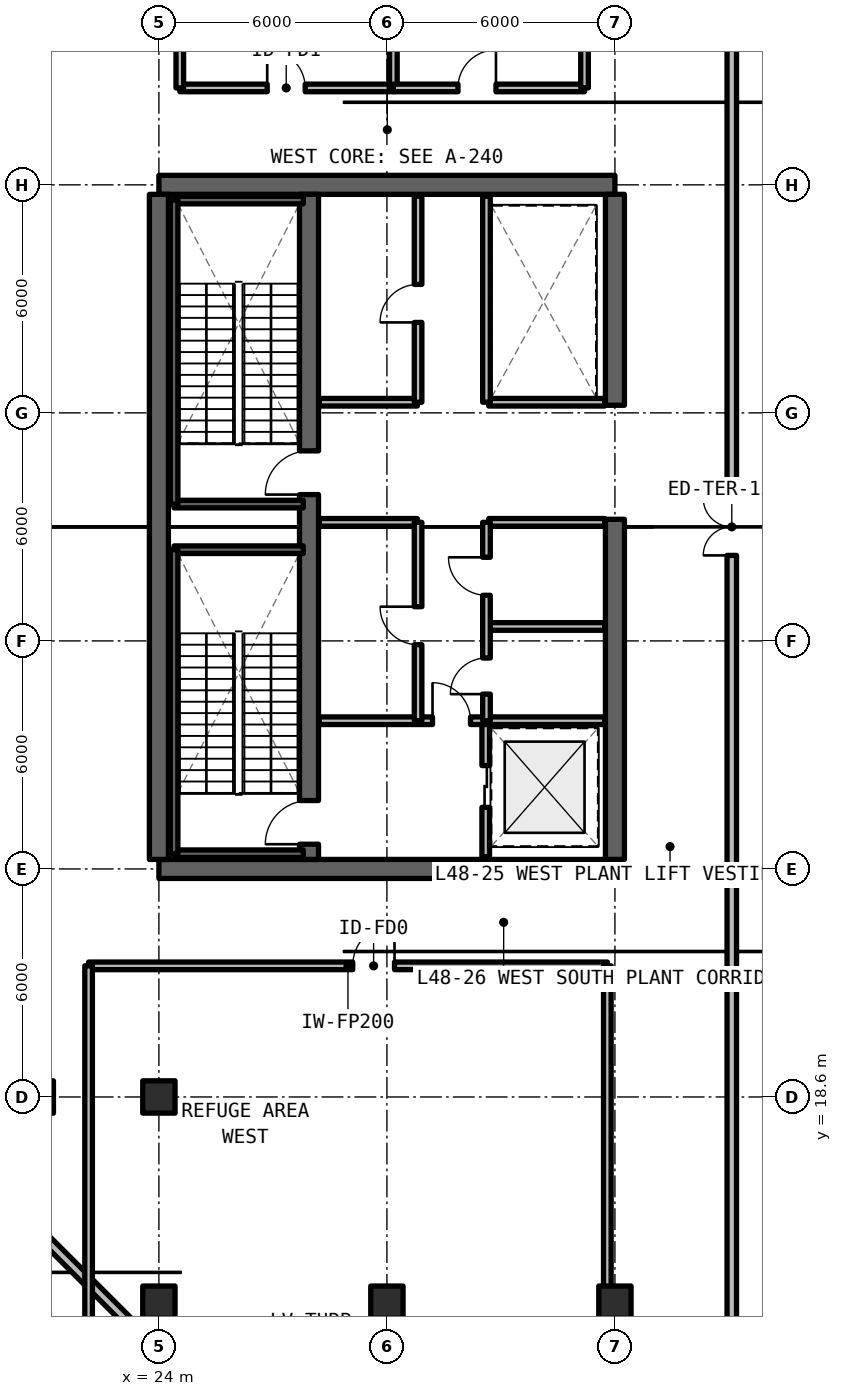
"""IFC4 building model, lengths in metres.
Left out: names, types, materials, properties, quantities, classifications, styles, units other than length and angle.
Written with IfcOpenShell. Run it as: python <this file> out.ifc"""

import sys

from ifc_helpers import new_model, si_unit, direction, frame, frame_2d, origin, origin_2d, place, context, subcontext, project, spatial, rectangle, extrude, element, fill, save


model = new_model("IFC4")
c1 = context("Model", 3, precision=1e-05, world=origin(), true_north=direction((0.0, 1.0)))
c2 = subcontext(c1, "Body", "Model", "MODEL_VIEW")
j1 = project(units=[si_unit("LENGTHUNIT", "METRE"), si_unit("PLANEANGLEUNIT", "RADIAN")], contexts=[c1])
p1 = place(None, origin())
s1 = spatial("IfcSite", under=j1, at=p1, CompositionType="ELEMENT")
p2 = place(p1, origin())
s2 = spatial("IfcBuilding", under=s1, at=p2, CompositionType="ELEMENT")
p3 = place(p2, frame((0.0, 0.0, 172.92)))
s3 = spatial("IfcBuildingStorey", under=s2, at=p3, CompositionType="ELEMENT", Elevation=172.92)
for number, where, z_axis, x_axis in (
    (1, (24.0, 24.6, 0.0), (0.0, 0.0, 1.0), (1.0, 0.0, 0.0)),
    (2, (36.0, 42.6, 0.0), (0.0, 0.0, 1.0), (-1.0, 0.0, 0.0)),
):
    element("IfcWall", number, at=place(p3, frame(where, z_axis=z_axis, x_axis=x_axis)), inside=s3, PredefinedType="SHEAR", context=c2, shape_type="SweptSolid", body=[
        extrude(rectangle(XDim=12.0, YDim=0.5, at=frame_2d((6.0, 0.0))), origin(), (0.0, 0.0, 1.0), 4.95),
    ])
p4 = place(p3, frame((24.0, 24.85, 0.0), z_axis=(0.0, 0.0, 1.0), x_axis=(0.0, 1.0, 0.0)))
e3 = element("IfcWall", 3, at=p4, inside=s3, PredefinedType="SHEAR", context=c2, shape_type="SweptSolid", body=[
    extrude(rectangle(XDim=17.5, YDim=0.5, at=frame_2d((8.75, 0.0))), origin(), (0.0, 0.0, 1.0), 4.95),
])
p5 = place(p3, frame((36.0, 24.85, 0.0), z_axis=(0.0, 0.0, 1.0), x_axis=(0.0, 1.0, 0.0)))
e4 = element("IfcWall", 4, at=p5, inside=s3, PredefinedType="SHEAR", context=c2, shape_type="SweptSolid", body=[
    extrude(rectangle(XDim=8.95, YDim=0.5, at=frame_2d((4.475, 0.0))), origin(), (0.0, 0.0, 1.0), 4.95),
])
p6 = place(p3, frame((36.0, 36.8, 0.0), z_axis=(0.0, 0.0, 1.0), x_axis=(0.0, 1.0, 0.0)))
e5 = element("IfcWall", 5, at=p6, inside=s3, PredefinedType="SHEAR", context=c2, shape_type="SweptSolid", body=[
    extrude(rectangle(XDim=5.55, YDim=0.5, at=frame_2d((2.775, 0.0))), origin(), (0.0, 0.0, 1.0), 4.95),
])
p7 = place(p3, frame((27.95, 24.85, 0.0), z_axis=(0.0, 0.0, 1.0), x_axis=(0.0, 1.0, 0.0)))
e6 = element("IfcWall", 6, at=p7, inside=s3, PredefinedType="SHEAR", context=c2, shape_type="SweptSolid", body=[
    extrude(rectangle(XDim=17.5, YDim=0.5, at=frame_2d((8.75, 0.0))), origin(), (0.0, 0.0, 1.0), 4.95),
])
p8 = place(p7, frame((0.4, 0.0, 0.0)))
e7 = element("IfcOpeningElement", 7, at=p8, cuts=e6, PredefinedType="OPENING", context=c2, shape_type="SweptSolid", body=[
    extrude(rectangle(XDim=1.15, YDim=2.15, at=frame_2d((0.575, 1.075))), frame((0.0, 0.26, 0.0), z_axis=(0.0, -1.0, 0.0), x_axis=(1.0, 0.0, 0.0)), (0.0, 0.0, 1.0), 0.52),
])
p9 = place(p7, frame((9.6, 0.0, 0.0)))
e8 = element("IfcOpeningElement", 8, at=p9, cuts=e6, PredefinedType="OPENING", context=c2, shape_type="SweptSolid", body=[
    extrude(rectangle(XDim=1.15, YDim=2.15, at=frame_2d((0.575, 1.075))), frame((0.0, 0.26, 0.0), z_axis=(0.0, -1.0, 0.0), x_axis=(1.0, 0.0, 0.0)), (0.0, 0.0, 1.0), 0.52),
])
p10 = place(p3, frame((20.8, 18.6, 0.0), z_axis=(0.0, 0.0, 1.0), x_axis=(1.0, 0.0, 0.0)))
e9 = element("IfcColumn", 9, at=p10, inside=s3, PredefinedType="COLUMN", context=c2, shape_type="SweptSolid", body=[
    extrude(rectangle(XDim=0.85, YDim=0.85, at=origin_2d()), origin(), (0.0, 0.0, 1.0), 4.67),
])
p11 = place(p3, frame((24.0, 18.6, 0.0), z_axis=(0.0, 0.0, 1.0), x_axis=(1.0, 0.0, 0.0)))
e10 = element("IfcColumn", 10, at=p11, inside=s3, PredefinedType="COLUMN", context=c2, shape_type="SweptSolid", body=[
    extrude(rectangle(XDim=0.85, YDim=0.85, at=origin_2d()), origin(), (0.0, 0.0, 1.0), 4.95),
])
for number, where, z_axis, x_axis in (
    (11, (24.0, 13.2, 0.0), (0.0, 0.0, 1.0), (1.0, 0.0, 0.0)),
    (12, (30.0, 13.2, 0.0), (0.0, 0.0, 1.0), (1.0, 0.0, 0.0)),
    (13, (36.0, 13.2, 0.0), (0.0, 0.0, 1.0), (1.0, 0.0, 0.0)),
):
    element("IfcColumn", number, at=place(p3, frame(where, z_axis=z_axis, x_axis=x_axis)), inside=s3, PredefinedType="COLUMN", context=c2, shape_type="SweptSolid", body=[
        extrude(rectangle(XDim=0.85, YDim=0.85, at=origin_2d()), origin(), (0.0, 0.0, 1.0), 4.67),
    ])
p12 = place(p3, frame((39.075, 12.025, 0.0), z_axis=(0.0, 0.0, 1.0), x_axis=(0.0, 1.0, 0.0)))
e14 = element("IfcWall", 14, at=p12, inside=s3, PredefinedType="SOLIDWALL", context=c2, shape_type="SweptSolid", body=[
    extrude(rectangle(XDim=43.15, YDim=0.25, at=frame_2d((21.575, 0.0))), origin(), (0.0, 0.0, 1.0), 4.67),
])
p13 = place(p12, frame((20.825, 0.0, 0.0)))
e15 = element("IfcOpeningElement", 15, at=p13, cuts=e14, PredefinedType="OPENING", context=c2, shape_type="SweptSolid", body=[
    extrude(rectangle(XDim=1.5, YDim=2.2, at=frame_2d((0.75, 1.1))), frame((0.0, 0.135, 0.0), z_axis=(0.0, -1.0, 0.0), x_axis=(1.0, 0.0, 0.0)), (0.0, 0.0, 1.0), 0.27),
])
p14 = place(p3, frame((19.725, 16.152, 0.0), z_axis=(0.0, 0.0, 1.0), x_axis=(0.70708586489, -0.707127696864, 0.0)))
e16 = element("IfcWall", 16, at=p14, inside=s3, PredefinedType="SOLIDWALL", context=c2, shape_type="SweptSolid", body=[
    extrude(rectangle(XDim=5.836, YDim=0.25, at=frame_2d((2.918, 0.0))), origin(), (0.0, 0.0, 1.0), 4.67),
])
p15 = place(p3, frame((32.6, 24.92, 0.0), z_axis=(0.0, 0.0, 1.0), x_axis=(0.0, 1.0, 0.0)))
e17 = element("IfcWall", 17, at=p15, inside=s3, PredefinedType="SOLIDWALL", context=c2, shape_type="SweptSolid", body=[
    extrude(rectangle(XDim=3.58, YDim=0.2, at=frame_2d((1.79, 0.0))), origin(), (0.0, 0.0, 1.0), 3.89),
])
p16 = place(p15, frame((1.3, 0.0, 0.0)))
e18 = element("IfcOpeningElement", 18, at=p16, cuts=e17, PredefinedType="OPENING", context=c2, shape_type="SweptSolid", body=[
    extrude(rectangle(XDim=1.1, YDim=2.2, at=frame_2d((0.55, 1.1))), frame((0.0, 0.11, 0.0), z_axis=(0.0, -1.0, 0.0), x_axis=(1.0, 0.0, 0.0)), (0.0, 0.0, 1.0), 0.22),
])
p17 = place(p3, frame((28.22, 28.5, 0.0), z_axis=(0.0, 0.0, 1.0), x_axis=(1.0, 0.0, 0.0)))
e19 = element("IfcWall", 19, at=p17, inside=s3, PredefinedType="SOLIDWALL", context=c2, shape_type="SweptSolid", body=[
    extrude(rectangle(XDim=7.51, YDim=0.2, at=frame_2d((3.755, 0.0))), origin(), (0.0, 0.0, 1.0), 3.89),
])
p18 = place(p17, frame((2.98, 0.0, 0.0)))
e20 = element("IfcOpeningElement", 20, at=p18, cuts=e19, PredefinedType="OPENING", context=c2, shape_type="SweptSolid", body=[
    extrude(rectangle(XDim=1.0, YDim=2.15, at=frame_2d((0.5, 1.075))), frame((0.0, 0.11, 0.0), z_axis=(0.0, -1.0, 0.0), x_axis=(1.0, 0.0, 0.0)), (0.0, 0.0, 1.0), 0.22),
])
p19 = place(p3, frame((28.22, 33.72, 0.0), z_axis=(0.0, 0.0, 1.0), x_axis=(1.0, 0.0, 0.0)))
e21 = element("IfcWall", 21, at=p19, inside=s3, PredefinedType="SOLIDWALL", context=c2, shape_type="SweptSolid", body=[
    extrude(rectangle(XDim=2.58, YDim=0.2, at=frame_2d((1.29, 0.0))), origin(), (0.0, 0.0, 1.0), 3.89),
])
p20 = place(p3, frame((30.82, 28.5, 0.0), z_axis=(0.0, 0.0, 1.0), x_axis=(0.0, 1.0, 0.0)))
e22 = element("IfcWall", 22, at=p20, inside=s3, PredefinedType="SOLIDWALL", context=c2, shape_type="SweptSolid", body=[
    extrude(rectangle(XDim=5.22, YDim=0.2, at=frame_2d((2.61, 0.0))), origin(), (0.0, 0.0, 1.0), 3.89),
])
p21 = place(p20, frame((2.0, 0.0, 0.0)))
e23 = element("IfcOpeningElement", 23, at=p21, cuts=e22, PredefinedType="OPENING", context=c2, shape_type="SweptSolid", body=[
    extrude(rectangle(XDim=1.0, YDim=2.15, at=frame_2d((0.5, 1.075))), frame((0.0, 0.11, 0.0), z_axis=(0.0, -1.0, 0.0), x_axis=(1.0, 0.0, 0.0)), (0.0, 0.0, 1.0), 0.22),
])
for number, where, z_axis, x_axis in (
    (24, (32.68, 30.98, 0.0), (0.0, 0.0, 1.0), (1.0, 0.0, 0.0)),
    (25, (32.68, 33.72, 0.0), (0.0, 0.0, 1.0), (1.0, 0.0, 0.0)),
):
    element("IfcWall", number, at=place(p3, frame(where, z_axis=z_axis, x_axis=x_axis)), inside=s3, PredefinedType="SOLIDWALL", context=c2, shape_type="SweptSolid", body=[
        extrude(rectangle(XDim=3.05, YDim=0.2, at=frame_2d((1.525, 0.0))), origin(), (0.0, 0.0, 1.0), 3.89),
    ])
p22 = place(p3, frame((32.62, 28.5, 0.0), z_axis=(0.0, 0.0, 1.0), x_axis=(0.0, 1.0, 0.0)))
e26 = element("IfcWall", 26, at=p22, inside=s3, PredefinedType="SOLIDWALL", context=c2, shape_type="SweptSolid", body=[
    extrude(rectangle(XDim=5.22, YDim=0.2, at=frame_2d((2.61, 0.0))), origin(), (0.0, 0.0, 1.0), 3.89),
])
p23 = place(p22, frame((0.7, 0.0, 0.0)))
e27 = element("IfcOpeningElement", 27, at=p23, cuts=e26, PredefinedType="OPENING", context=c2, shape_type="SweptSolid", body=[
    extrude(rectangle(XDim=0.95, YDim=2.15, at=frame_2d((0.475, 1.075))), frame((0.0, 0.11, 0.0), z_axis=(0.0, -1.0, 0.0), x_axis=(1.0, 0.0, 0.0)), (0.0, 0.0, 1.0), 0.22),
])
p24 = place(p22, frame((3.3, 0.0, 0.0)))
e28 = element("IfcOpeningElement", 28, at=p24, cuts=e26, PredefinedType="OPENING", context=c2, shape_type="SweptSolid", body=[
    extrude(rectangle(XDim=1.0, YDim=2.15, at=frame_2d((0.5, 1.075))), frame((0.0, 0.11, 0.0), z_axis=(0.0, -1.0, 0.0), x_axis=(1.0, 0.0, 0.0)), (0.0, 0.0, 1.0), 0.22),
])
p25 = place(p3, frame((28.22, 36.88, 0.0), z_axis=(0.0, 0.0, 1.0), x_axis=(1.0, 0.0, 0.0)))
e29 = element("IfcWall", 29, at=p25, inside=s3, PredefinedType="SOLIDWALL", context=c2, shape_type="SweptSolid", body=[
    extrude(rectangle(XDim=2.58, YDim=0.2, at=frame_2d((1.29, 0.0))), origin(), (0.0, 0.0, 1.0), 3.89),
])
p26 = place(p3, frame((30.82, 36.88, 0.0), z_axis=(0.0, 0.0, 1.0), x_axis=(0.0, 1.0, 0.0)))
e30 = element("IfcWall", 30, at=p26, inside=s3, PredefinedType="SOLIDWALL", context=c2, shape_type="SweptSolid", body=[
    extrude(rectangle(XDim=5.42, YDim=0.2, at=frame_2d((2.71, 0.0))), origin(), (0.0, 0.0, 1.0), 3.89),
])
p27 = place(p26, frame((2.1, 0.0, 0.0)))
e31 = element("IfcOpeningElement", 31, at=p27, cuts=e30, PredefinedType="OPENING", context=c2, shape_type="SweptSolid", body=[
    extrude(rectangle(XDim=1.0, YDim=2.15, at=frame_2d((0.5, 1.075))), frame((0.0, 0.11, 0.0), z_axis=(0.0, -1.0, 0.0), x_axis=(1.0, 0.0, 0.0)), (0.0, 0.0, 1.0), 0.22),
])
p28 = place(p3, frame((32.68, 36.88, 0.0), z_axis=(0.0, 0.0, 1.0), x_axis=(1.0, 0.0, 0.0)))
e32 = element("IfcWall", 32, at=p28, inside=s3, PredefinedType="SOLIDWALL", context=c2, shape_type="SweptSolid", body=[
    extrude(rectangle(XDim=3.05, YDim=0.2, at=frame_2d((1.525, 0.0))), origin(), (0.0, 0.0, 1.0), 3.89),
])
p29 = place(p3, frame((32.62, 36.88, 0.0), z_axis=(0.0, 0.0, 1.0), x_axis=(0.0, 1.0, 0.0)))
e33 = element("IfcWall", 33, at=p29, inside=s3, PredefinedType="SOLIDWALL", context=c2, shape_type="SweptSolid", body=[
    extrude(rectangle(XDim=5.42, YDim=0.2, at=frame_2d((2.71, 0.0))), origin(), (0.0, 0.0, 1.0), 3.89),
])
p30 = place(p3, frame((22.15, 22.05, 0.0), z_axis=(0.0, 0.0, 1.0), x_axis=(1.0, 0.0, 0.0)))
e34 = element("IfcWall", 34, at=p30, inside=s3, PredefinedType="SOLIDWALL", context=c2, shape_type="SweptSolid", body=[
    extrude(rectangle(XDim=13.65, YDim=0.2, at=frame_2d((6.825, 0.0))), origin(), (0.0, 0.0, 1.0), 3.89),
])
p31 = place(p30, frame((6.95, 0.0, 0.0)))
e35 = element("IfcOpeningElement", 35, at=p31, cuts=e34, PredefinedType="OPENING", context=c2, shape_type="SweptSolid", body=[
    extrude(rectangle(XDim=1.1, YDim=2.15, at=frame_2d((0.55, 1.075))), frame((0.0, 0.11, 0.0), z_axis=(0.0, -1.0, 0.0), x_axis=(1.0, 0.0, 0.0)), (0.0, 0.0, 1.0), 0.22),
])
p32 = place(p3, frame((22.15, 12.15, 0.0), z_axis=(0.0, 0.0, 1.0), x_axis=(0.0, 1.0, 0.0)))
e36 = element("IfcWall", 36, at=p32, inside=s3, PredefinedType="SOLIDWALL", context=c2, shape_type="SweptSolid", body=[
    extrude(rectangle(XDim=9.9, YDim=0.2, at=frame_2d((4.95, 0.0))), origin(), (0.0, 0.0, 1.0), 3.89),
])
p33 = place(p3, frame((35.8, 12.15, 0.0), z_axis=(0.0, 0.0, 1.0), x_axis=(0.0, 1.0, 0.0)))
e37 = element("IfcWall", 37, at=p33, inside=s3, PredefinedType="SOLIDWALL", context=c2, shape_type="SweptSolid", body=[
    extrude(rectangle(XDim=9.9, YDim=0.2, at=frame_2d((4.95, 0.0))), origin(), (0.0, 0.0, 1.0), 3.647),
])
p34 = place(p3, frame((24.55, 45.15, 0.0), z_axis=(0.0, 0.0, 1.0), x_axis=(1.0, 0.0, 0.0)))
e38 = element("IfcWall", 38, at=p34, inside=s3, PredefinedType="SOLIDWALL", context=c2, shape_type="SweptSolid", body=[
    extrude(rectangle(XDim=5.62, YDim=0.2, at=frame_2d((2.81, 0.0))), origin(), (0.0, 0.0, 1.0), 3.89),
])
p35 = place(p34, frame((2.3, 0.0, 0.0)))
e39 = element("IfcOpeningElement", 39, at=p35, cuts=e38, PredefinedType="OPENING", context=c2, shape_type="SweptSolid", body=[
    extrude(rectangle(XDim=1.0, YDim=2.15, at=frame_2d((0.5, 1.075))), frame((0.0, 0.11, 0.0), z_axis=(0.0, -1.0, 0.0), x_axis=(1.0, 0.0, 0.0)), (0.0, 0.0, 1.0), 0.22),
])
p36 = place(p3, frame((24.55, 45.15, 0.0), z_axis=(0.0, 0.0, 1.0), x_axis=(0.0, 1.0, 0.0)))
e40 = element("IfcWall", 40, at=p36, inside=s3, PredefinedType="SOLIDWALL", context=c2, shape_type="SweptSolid", body=[
    extrude(rectangle(XDim=9.9, YDim=0.2, at=frame_2d((4.95, 0.0))), origin(), (0.0, 0.0, 1.0), 3.89),
])
p37 = place(p3, frame((30.17, 45.15, 0.0), z_axis=(0.0, 0.0, 1.0), x_axis=(0.0, 1.0, 0.0)))
e41 = element("IfcWall", 41, at=p37, inside=s3, PredefinedType="SOLIDWALL", context=c2, shape_type="SweptSolid", body=[
    extrude(rectangle(XDim=9.9, YDim=0.2, at=frame_2d((4.95, 0.0))), origin(), (0.0, 0.0, 1.0), 3.647),
])
p38 = place(p3, frame((30.17, 45.15, 0.0), z_axis=(0.0, 0.0, 1.0), x_axis=(1.0, 0.0, 0.0)))
e42 = element("IfcWall", 42, at=p38, inside=s3, PredefinedType="SOLIDWALL", context=c2, shape_type="SweptSolid", body=[
    extrude(rectangle(XDim=5.03, YDim=0.2, at=frame_2d((2.515, 0.0))), origin(), (0.0, 0.0, 1.0), 3.89),
])
p39 = place(p38, frame((1.7, 0.0, 0.0)))
e43 = element("IfcOpeningElement", 43, at=p39, cuts=e42, PredefinedType="OPENING", context=c2, shape_type="SweptSolid", body=[
    extrude(rectangle(XDim=1.0, YDim=2.15, at=frame_2d((0.5, 1.075))), frame((0.0, 0.11, 0.0), z_axis=(0.0, -1.0, 0.0), x_axis=(1.0, 0.0, 0.0)), (0.0, 0.0, 1.0), 0.22),
])
p40 = place(p3, frame((35.2, 45.15, 0.0), z_axis=(0.0, 0.0, 1.0), x_axis=(0.0, 1.0, 0.0)))
e44 = element("IfcWall", 44, at=p40, inside=s3, PredefinedType="SOLIDWALL", context=c2, shape_type="SweptSolid", body=[
    extrude(rectangle(XDim=9.9, YDim=0.2, at=frame_2d((4.95, 0.0))), origin(), (0.0, 0.0, 1.0), 3.89),
])
for number, where, z_axis, x_axis in (
    (45, (24.4, 25.0, 0.0), (0.0, 0.0, 1.0), (1.0, 0.0, 0.0)),
    (46, (27.8, 33.0, 0.0), (0.0, 0.0, 1.0), (-1.0, 0.0, 0.0)),
):
    element("IfcWall", number, at=place(p3, frame(where, z_axis=z_axis, x_axis=x_axis)), inside=s3, PredefinedType="SOLIDWALL", context=c2, shape_type="SweptSolid", body=[
        extrude(rectangle(XDim=3.4, YDim=0.2, at=frame_2d((1.7, 0.0))), origin(), (0.0, 0.0, 1.0), 4.95),
    ])
p41 = place(p3, frame((24.4, 33.0, 0.0), z_axis=(0.0, 0.0, 1.0), x_axis=(0.0, -1.0, 0.0)))
e47 = element("IfcWall", 47, at=p41, inside=s3, PredefinedType="SOLIDWALL", context=c2, shape_type="SweptSolid", body=[
    extrude(rectangle(XDim=8.0, YDim=0.2, at=frame_2d((4.0, 0.0))), origin(), (0.0, 0.0, 1.0), 4.95),
])
for number, where, z_axis, x_axis in (
    (48, (24.4, 34.2, 0.0), (0.0, 0.0, 1.0), (1.0, 0.0, 0.0)),
    (49, (27.8, 42.2, 0.0), (0.0, 0.0, 1.0), (-1.0, 0.0, 0.0)),
):
    element("IfcWall", number, at=place(p3, frame(where, z_axis=z_axis, x_axis=x_axis)), inside=s3, PredefinedType="SOLIDWALL", context=c2, shape_type="SweptSolid", body=[
        extrude(rectangle(XDim=3.4, YDim=0.2, at=frame_2d((1.7, 0.0))), origin(), (0.0, 0.0, 1.0), 4.95),
    ])
p42 = place(p3, frame((24.4, 42.2, 0.0), z_axis=(0.0, 0.0, 1.0), x_axis=(0.0, -1.0, 0.0)))
e50 = element("IfcWall", 50, at=p42, inside=s3, PredefinedType="SOLIDWALL", context=c2, shape_type="SweptSolid", body=[
    extrude(rectangle(XDim=8.0, YDim=0.2, at=frame_2d((4.0, 0.0))), origin(), (0.0, 0.0, 1.0), 4.95),
])
p43 = place(p13, origin())
e51 = element("IfcDoor", 51, at=p43, inside=s3, OperationType="SINGLE_SWING_RIGHT", PredefinedType="DOOR", context=c2, shape_type="SweptSolid", body=[
    extrude(rectangle(XDim=1.5, YDim=2.2, at=frame_2d((0.75, 1.1))), frame((0.0, 0.025, 0.0), z_axis=(0.0, -1.0, 0.0), x_axis=(1.0, 0.0, 0.0)), (0.0, 0.0, 1.0), 0.05),
])
fill(e15, e51)
p44 = place(p16, origin())
e52 = element("IfcDoor", 52, at=p44, inside=s3, OperationType="SLIDING_TO_LEFT", PredefinedType="DOOR", context=c2, shape_type="SweptSolid", body=[
    extrude(rectangle(XDim=1.1, YDim=2.2, at=frame_2d((0.55, 1.1))), frame((0.0, 0.025, 0.0), z_axis=(0.0, -1.0, 0.0), x_axis=(1.0, 0.0, 0.0)), (0.0, 0.0, 1.0), 0.05),
])
fill(e18, e52)
p45 = place(p18, origin())
e53 = element("IfcDoor", 53, at=p45, inside=s3, OperationType="SINGLE_SWING_LEFT", PredefinedType="DOOR", context=c2, shape_type="SweptSolid", body=[
    extrude(rectangle(XDim=1.0, YDim=2.15, at=frame_2d((0.5, 1.075))), frame((0.0, 0.025, 0.0), z_axis=(0.0, -1.0, 0.0), x_axis=(1.0, 0.0, 0.0)), (0.0, 0.0, 1.0), 0.05),
])
fill(e20, e53)
p46 = place(p21, origin())
e54 = element("IfcDoor", 54, at=p46, inside=s3, OperationType="SINGLE_SWING_RIGHT", PredefinedType="DOOR", context=c2, shape_type="SweptSolid", body=[
    extrude(rectangle(XDim=1.0, YDim=2.15, at=frame_2d((0.5, 1.075))), frame((0.0, 0.025, 0.0), z_axis=(0.0, -1.0, 0.0), x_axis=(1.0, 0.0, 0.0)), (0.0, 0.0, 1.0), 0.05),
])
fill(e23, e54)
p47 = place(p23, origin())
e55 = element("IfcDoor", 55, at=p47, inside=s3, OperationType="SINGLE_SWING_LEFT", PredefinedType="DOOR", context=c2, shape_type="SweptSolid", body=[
    extrude(rectangle(XDim=0.95, YDim=2.15, at=frame_2d((0.475, 1.075))), frame((0.0, 0.025, 0.0), z_axis=(0.0, -1.0, 0.0), x_axis=(1.0, 0.0, 0.0)), (0.0, 0.0, 1.0), 0.05),
])
fill(e27, e55)
p48 = place(p24, origin())
e56 = element("IfcDoor", 56, at=p48, inside=s3, OperationType="SINGLE_SWING_RIGHT", PredefinedType="DOOR", context=c2, shape_type="SweptSolid", body=[
    extrude(rectangle(XDim=1.0, YDim=2.15, at=frame_2d((0.5, 1.075))), frame((0.0, 0.025, 0.0), z_axis=(0.0, -1.0, 0.0), x_axis=(1.0, 0.0, 0.0)), (0.0, 0.0, 1.0), 0.05),
])
fill(e28, e56)
p49 = place(p27, origin())
e57 = element("IfcDoor", 57, at=p49, inside=s3, OperationType="SINGLE_SWING_LEFT", PredefinedType="DOOR", context=c2, shape_type="SweptSolid", body=[
    extrude(rectangle(XDim=1.0, YDim=2.15, at=frame_2d((0.5, 1.075))), frame((0.0, 0.025, 0.0), z_axis=(0.0, -1.0, 0.0), x_axis=(1.0, 0.0, 0.0)), (0.0, 0.0, 1.0), 0.05),
])
fill(e31, e57)
p50 = place(p31, origin())
e58 = element("IfcDoor", 58, at=p50, inside=s3, OperationType="SINGLE_SWING_RIGHT", PredefinedType="DOOR", context=c2, shape_type="SweptSolid", body=[
    extrude(rectangle(XDim=1.1, YDim=2.15, at=frame_2d((0.55, 1.075))), frame((0.0, 0.025, 0.0), z_axis=(0.0, -1.0, 0.0), x_axis=(1.0, 0.0, 0.0)), (0.0, 0.0, 1.0), 0.05),
])
fill(e35, e58)
p51 = place(p35, origin())
e59 = element("IfcDoor", 59, at=p51, inside=s3, OperationType="SINGLE_SWING_LEFT", PredefinedType="DOOR", context=c2, shape_type="SweptSolid", body=[
    extrude(rectangle(XDim=1.0, YDim=2.15, at=frame_2d((0.5, 1.075))), frame((0.0, 0.025, 0.0), z_axis=(0.0, -1.0, 0.0), x_axis=(1.0, 0.0, 0.0)), (0.0, 0.0, 1.0), 0.05),
])
fill(e39, e59)
p52 = place(p39, origin())
e60 = element("IfcDoor", 60, at=p52, inside=s3, OperationType="SINGLE_SWING_RIGHT", PredefinedType="DOOR", context=c2, shape_type="SweptSolid", body=[
    extrude(rectangle(XDim=1.0, YDim=2.15, at=frame_2d((0.5, 1.075))), frame((0.0, 0.025, 0.0), z_axis=(0.0, -1.0, 0.0), x_axis=(1.0, 0.0, 0.0)), (0.0, 0.0, 1.0), 0.05),
])
fill(e43, e60)
p53 = place(p8, origin())
e61 = element("IfcDoor", 61, at=p53, inside=s3, OperationType="SINGLE_SWING_LEFT", PredefinedType="DOOR", context=c2, shape_type="SweptSolid", body=[
    extrude(rectangle(XDim=1.15, YDim=2.15, at=frame_2d((0.575, 1.075))), frame((0.0, 0.025, 0.0), z_axis=(0.0, -1.0, 0.0), x_axis=(1.0, 0.0, 0.0)), (0.0, 0.0, 1.0), 0.05),
])
fill(e7, e61)
p54 = place(p9, origin())
e62 = element("IfcDoor", 62, at=p54, inside=s3, OperationType="SINGLE_SWING_RIGHT", PredefinedType="DOOR", context=c2, shape_type="SweptSolid", body=[
    extrude(rectangle(XDim=1.15, YDim=2.15, at=frame_2d((0.575, 1.075))), frame((0.0, 0.025, 0.0), z_axis=(0.0, -1.0, 0.0), x_axis=(1.0, 0.0, 0.0)), (0.0, 0.0, 1.0), 0.05),
])
fill(e8, e62)
save(model, sys.argv[1])
